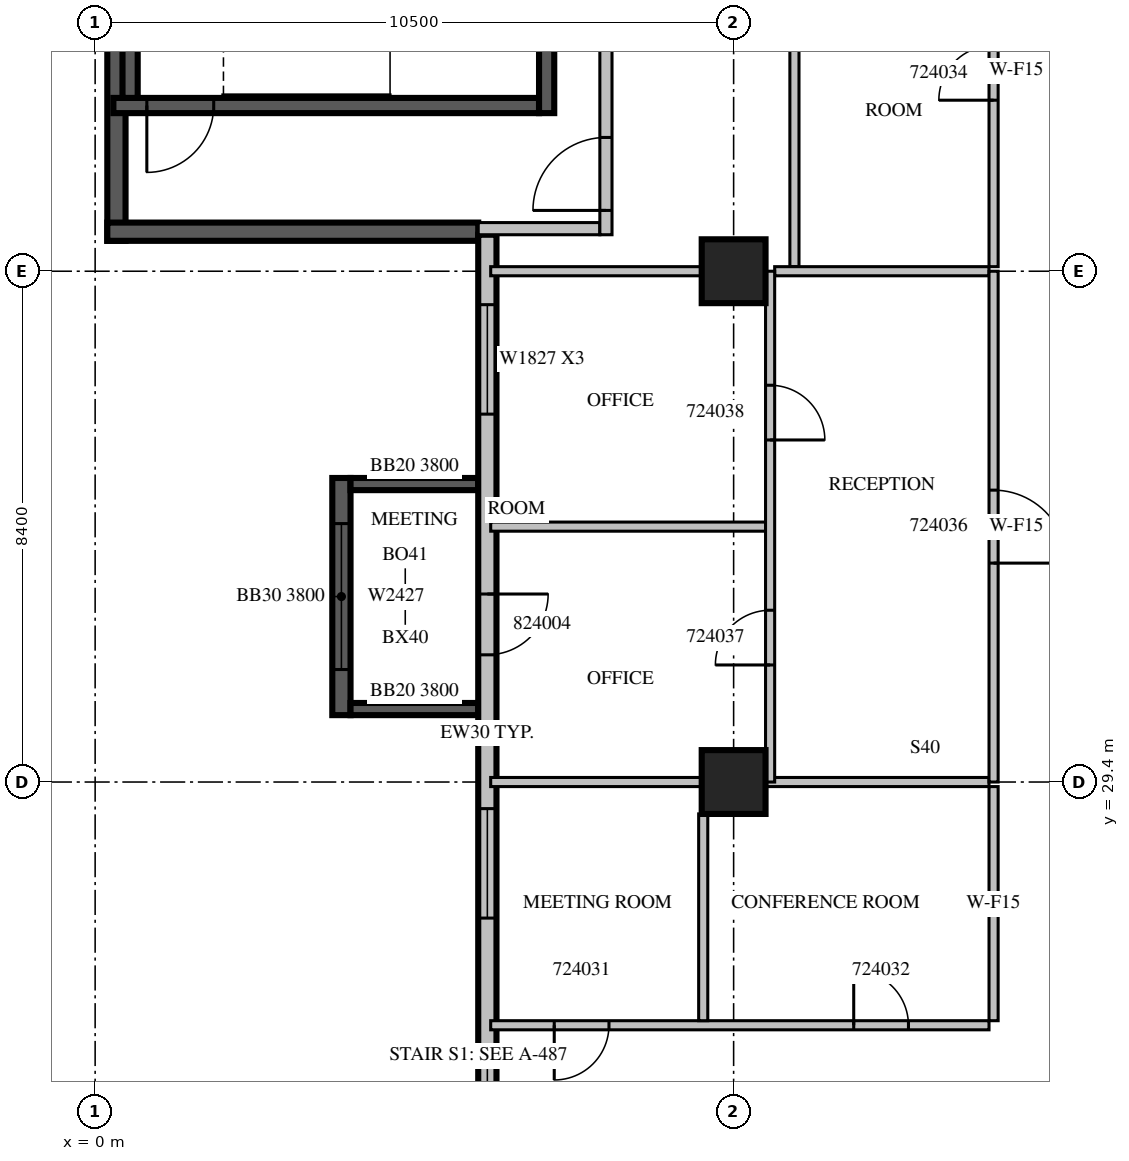
"""IFC4 building model, lengths in metres.
Left out: names, types, materials, properties, quantities, classifications, styles, units other than length and angle.
Written with IfcOpenShell. Run it as: python <this file> out.ifc"""

import sys

from ifc_helpers import new_model, si_unit, direction, frame, frame_2d, origin, origin_2d, place, context, subcontext, project, spatial, rectangle, extrude, source, transform, mapped, element, fill, save


model = new_model("IFC4")
c1 = context("Model", 3, precision=1e-05, world=origin(), true_north=direction((0.0, 1.0)))
c2 = subcontext(c1, "Body", "Model", "MODEL_VIEW")
j1 = project(units=[si_unit("LENGTHUNIT", "METRE"), si_unit("PLANEANGLEUNIT", "RADIAN")], contexts=[c1])
p1 = place(None, origin())
s1 = spatial("IfcSite", under=j1, at=p1, CompositionType="ELEMENT")
p2 = place(p1, origin())
s2 = spatial("IfcBuilding", under=s1, at=p2, CompositionType="ELEMENT")
p3 = place(p2, frame((0.0, 0.0, 111.9)))
s3 = spatial("IfcBuildingStorey", under=s2, at=p3, CompositionType="ELEMENT", Elevation=111.9)
m1 = source(origin(), c2, "Body", "SweptSolid", [
    extrude(rectangle(XDim=1.05, YDim=1.05, at=origin_2d()), origin(), (0.0, 0.0, 1.0), 4.2),
])
for number, where, z_axis, x_axis in (
    (1, (10.5, 29.4, 0.0), (0.0, 0.0, 1.0), (1.0, 0.0, 0.0)),
    (2, (10.5, 37.8, 0.0), (0.0, 0.0, 1.0), (1.0, 0.0, 0.0)),
):
    element("IfcColumn", number, at=place(p3, frame(where, z_axis=z_axis, x_axis=x_axis)), inside=s3, PredefinedType="COLUMN", context=c2, shape_type="MappedRepresentation", body=[
        mapped(m1, transform((0.0, 0.0, 0.0), scale=1.0)),
    ])
p4 = place(p3, frame((4.05, 34.4, 0.0), z_axis=(0.0, 0.0, 1.0), x_axis=(0.0, -1.0, 0.0)))
e3 = element("IfcWall", 3, at=p4, inside=s3, PredefinedType="SOLIDWALL", context=c2, shape_type="SweptSolid", body=[
    extrude(rectangle(XDim=3.9, YDim=0.3, at=frame_2d((1.95, 0.0))), origin(), (0.0, 0.0, 1.0), 3.8),
])
m2 = source(origin(), c2, "Body", "SweptSolid", [
    extrude(rectangle(XDim=2.4, YDim=2.7, at=frame_2d((1.2, 1.35))), frame((0.0, 0.16, 0.0), z_axis=(0.0, -1.0, 0.0), x_axis=(1.0, 0.0, 0.0)), (0.0, 0.0, 1.0), 0.32),
])
p5 = place(p4, frame((0.75, 0.0, 0.6)))
e4 = element("IfcOpeningElement", 4, at=p5, cuts=e3, PredefinedType="OPENING", context=c2, shape_type="MappedRepresentation", body=[
    mapped(m2, transform((0.0, 0.0, 0.0), scale=1.0)),
])
p6 = place(p3, frame((6.3, 34.3, 0.0), z_axis=(0.0, 0.0, 1.0), x_axis=(-1.0, 0.0, 0.0)))
e5 = element("IfcWall", 5, at=p6, inside=s3, PredefinedType="SOLIDWALL", context=c2, shape_type="SweptSolid", body=[
    extrude(rectangle(XDim=2.1, YDim=0.2, at=frame_2d((1.05, 0.0))), origin(), (0.0, 0.0, 1.0), 3.8),
])
m3 = source(origin(), c2, "Body", "SweptSolid", [
    extrude(rectangle(XDim=2.1, YDim=0.2, at=frame_2d((1.05, 0.0))), origin(), (0.0, 0.0, 1.0), 3.8),
])
p7 = place(p3, frame((6.3, 30.6, 0.0), z_axis=(0.0, 0.0, 1.0), x_axis=(-1.0, 0.0, 0.0)))
e6 = element("IfcWall", 6, at=p7, inside=s3, PredefinedType="SOLIDWALL", context=c2, shape_type="MappedRepresentation", body=[
    mapped(m3, transform((0.0, 0.0, 0.0), scale=1.0)),
])
m4 = source(origin(), c2, "Body", "SweptSolid", [
    extrude(rectangle(XDim=5.65, YDim=0.3, at=frame_2d((2.825, 0.0))), origin(), (0.0, 0.0, 1.0), 3.8),
])
p8 = place(p3, frame((0.35, 43.95, 0.0), z_axis=(0.0, 0.0, 1.0), x_axis=(0.0, -1.0, 0.0)))
e7 = element("IfcWall", 7, at=p8, inside=s3, PredefinedType="SOLIDWALL", context=c2, shape_type="MappedRepresentation", body=[
    mapped(m4, transform((0.0, 0.0, 0.0), scale=1.0)),
])
m5 = source(origin(), c2, "Body", "SweptSolid", [
    extrude(rectangle(XDim=6.1, YDim=0.3, at=frame_2d((3.05, 0.0))), origin(), (0.0, 0.0, 1.0), 3.8),
])
p9 = place(p3, frame((0.2, 38.45, 0.0), z_axis=(0.0, 0.0, 1.0), x_axis=(1.0, 0.0, 0.0)))
e8 = element("IfcWall", 8, at=p9, inside=s3, PredefinedType="SOLIDWALL", context=c2, shape_type="MappedRepresentation", body=[
    mapped(m5, transform((0.0, 0.0, 0.0), scale=1.0)),
])
m6 = source(origin(), c2, "Body", "SweptSolid", [
    extrude(rectangle(XDim=16.4, YDim=0.3, at=frame_2d((8.2, 0.0))), origin(), (0.0, 0.0, 1.0), 3.8),
])
p10 = place(p3, frame((6.45, 38.4, 0.0), z_axis=(0.0, 0.0, 1.0), x_axis=(0.0, -1.0, 0.0)))
e9 = element("IfcWall", 9, at=p10, inside=s3, PredefinedType="STANDARD", context=c2, shape_type="MappedRepresentation", body=[
    mapped(m6, transform((0.0, 0.0, 0.0), scale=1.0)),
])
m7 = source(origin(), c2, "Body", "SweptSolid", [
    extrude(rectangle(XDim=1.8, YDim=2.7, at=frame_2d((0.9, 1.35))), frame((0.0, 0.16, 0.0), z_axis=(0.0, -1.0, 0.0), x_axis=(1.0, 0.0, 0.0)), (0.0, 0.0, 1.0), 0.32),
])
p11 = place(p10, frame((1.15, 0.0, 0.6)))
e10 = element("IfcOpeningElement", 10, at=p11, cuts=e9, PredefinedType="OPENING", context=c2, shape_type="MappedRepresentation", body=[
    mapped(m7, transform((0.0, 0.0, 0.0), scale=1.0)),
])
p12 = place(p10, frame((9.438, 0.0, 0.6)))
e11 = element("IfcOpeningElement", 11, at=p12, cuts=e9, PredefinedType="OPENING", context=c2, shape_type="MappedRepresentation", body=[
    mapped(m7, transform((0.0, 0.0, 0.0), scale=1.0)),
])
p13 = place(p10, frame((13.537, 0.0, 0.6)))
e12 = element("IfcOpeningElement", 12, at=p13, cuts=e9, PredefinedType="OPENING", context=c2, shape_type="MappedRepresentation", body=[
    mapped(m7, transform((0.0, 0.0, 0.0), scale=1.0)),
])
m8 = source(origin(), c2, "Body", "SweptSolid", [
    extrude(rectangle(XDim=1.0, YDim=2.1, at=frame_2d((0.5, 1.05))), frame((0.0, 0.16, 0.0), z_axis=(0.0, -1.0, 0.0), x_axis=(1.0, 0.0, 0.0)), (0.0, 0.0, 1.0), 0.32),
])
p14 = place(p10, frame((5.908, 0.0, 0.0)))
e13 = element("IfcOpeningElement", 13, at=p14, cuts=e9, PredefinedType="OPENING", context=c2, shape_type="MappedRepresentation", body=[
    mapped(m8, transform((0.0, 0.0, 0.0), scale=1.0)),
])
m9 = source(origin(), c2, "Body", "SweptSolid", [
    extrude(rectangle(XDim=7.0, YDim=0.25, at=frame_2d((3.5, 0.0))), origin(), (0.0, 0.0, 1.0), 3.8),
])
p15 = place(p3, frame((0.3, 40.525, 0.0), z_axis=(0.0, 0.0, 1.0), x_axis=(1.0, 0.0, 0.0)))
e14 = element("IfcWall", 14, at=p15, inside=s3, PredefinedType="SOLIDWALL", context=c2, shape_type="MappedRepresentation", body=[
    mapped(m9, transform((0.0, 0.0, 0.0), scale=1.0)),
])
m10 = source(origin(), c2, "Body", "SweptSolid", [
    extrude(rectangle(XDim=1.1, YDim=2.1, at=frame_2d((0.55, 1.05))), frame((0.0, 0.135, 0.0), z_axis=(0.0, -1.0, 0.0), x_axis=(1.0, 0.0, 0.0)), (0.0, 0.0, 1.0), 0.27),
])
p16 = place(p15, frame((0.55, 0.0, 0.0)))
e15 = element("IfcOpeningElement", 15, at=p16, cuts=e14, PredefinedType="OPENING", context=c2, shape_type="MappedRepresentation", body=[
    mapped(m10, transform((0.0, 0.0, 0.0), scale=1.0)),
])
m11 = source(origin(), c2, "Body", "SweptSolid", [
    extrude(rectangle(XDim=3.45, YDim=0.25, at=frame_2d((1.725, 0.0))), origin(), (0.0, 0.0, 1.0), 3.8),
])
p17 = place(p3, frame((7.425, 40.4, 0.0), z_axis=(0.0, 0.0, 1.0), x_axis=(0.0, 1.0, 0.0)))
e16 = element("IfcWall", 16, at=p17, inside=s3, PredefinedType="SOLIDWALL", context=c2, shape_type="MappedRepresentation", body=[
    mapped(m11, transform((0.0, 0.0, 0.0), scale=1.0)),
])
m12 = source(origin(), c2, "Body", "SweptSolid", [
    extrude(rectangle(XDim=2.95, YDim=0.25, at=frame_2d((1.475, 0.0))), origin(), (0.0, 0.0, 1.0), 3.8),
])
p18 = place(p3, frame((0.575, 40.65, 0.0), z_axis=(0.0, 0.0, 1.0), x_axis=(0.0, 1.0, 0.0)))
e17 = element("IfcWall", 17, at=p18, inside=s3, PredefinedType="SOLIDWALL", context=c2, shape_type="MappedRepresentation", body=[
    mapped(m12, transform((0.0, 0.0, 0.0), scale=1.0)),
])
m13 = source(origin(), c2, "Body", "SweptSolid", [
    extrude(rectangle(XDim=2.0, YDim=0.2, at=frame_2d((1.0, 0.0))), origin(), (0.0, 0.0, 1.0), 3.8),
])
p19 = place(p3, frame((6.3, 38.5, 0.0), z_axis=(0.0, 0.0, 1.0), x_axis=(1.0, 0.0, 0.0)))
e18 = element("IfcWall", 18, at=p19, inside=s3, PredefinedType="PARTITIONING", context=c2, shape_type="MappedRepresentation", body=[
    mapped(m13, transform((0.0, 0.0, 0.0), scale=1.0)),
])
m14 = source(origin(), c2, "Body", "SweptSolid", [
    extrude(rectangle(XDim=5.45, YDim=0.2, at=frame_2d((2.725, 0.0))), origin(), (0.0, 0.0, 1.0), 3.8),
])
p20 = place(p3, frame((8.4, 38.4, 0.0), z_axis=(0.0, 0.0, 1.0), x_axis=(0.0, 1.0, 0.0)))
e19 = element("IfcWall", 19, at=p20, inside=s3, PredefinedType="PARTITIONING", context=c2, shape_type="MappedRepresentation", body=[
    mapped(m14, transform((0.0, 0.0, 0.0), scale=1.0)),
])
m15 = source(origin(), c2, "Body", "SweptSolid", [
    extrude(rectangle(XDim=1.2, YDim=2.1, at=frame_2d((0.6, 1.05))), frame((0.0, 0.11, 0.0), z_axis=(0.0, -1.0, 0.0), x_axis=(1.0, 0.0, 0.0)), (0.0, 0.0, 1.0), 0.22),
])
p21 = place(p20, frame((0.4, 0.0, 0.0)))
e20 = element("IfcOpeningElement", 20, at=p21, cuts=e19, PredefinedType="OPENING", context=c2, shape_type="MappedRepresentation", body=[
    mapped(m15, transform((0.0, 0.0, 0.0), scale=1.0)),
])
m16 = source(origin(), c2, "Body", "SweptSolid", [
    extrude(rectangle(XDim=0.9, YDim=2.1, at=frame_2d((0.45, 1.05))), frame((0.0, 0.11, 0.0), z_axis=(0.0, -1.0, 0.0), x_axis=(1.0, 0.0, 0.0)), (0.0, 0.0, 1.0), 0.22),
])
p22 = place(p20, frame((3.25, 0.0, 0.0)))
e21 = element("IfcOpeningElement", 21, at=p22, cuts=e19, PredefinedType="OPENING", context=c2, shape_type="MappedRepresentation", body=[
    mapped(m16, transform((0.0, 0.0, 0.0), scale=1.0)),
])
m17 = source(origin(), c2, "Body", "SweptSolid", [
    extrude(rectangle(XDim=8.195, YDim=0.15, at=frame_2d((4.098, 0.0))), origin(), (0.0, 0.0, 1.0), 3.8),
])
p23 = place(p3, frame((6.505, 25.4, 0.0), z_axis=(0.0, 0.0, 1.0), x_axis=(1.0, 0.0, 0.0)))
e22 = element("IfcWall", 22, at=p23, inside=s3, PredefinedType="PARTITIONING", context=c2, shape_type="MappedRepresentation", body=[
    mapped(m17, transform((0.0, 0.0, 0.0), scale=1.0)),
])
m18 = source(origin(), c2, "Body", "SweptSolid", [
    extrude(rectangle(XDim=0.9, YDim=2.1, at=frame_2d((0.45, 1.05))), frame((0.0, 0.085, 0.0), z_axis=(0.0, -1.0, 0.0), x_axis=(1.0, 0.0, 0.0)), (0.0, 0.0, 1.0), 0.17),
])
p24 = place(p23, frame((1.045, 0.0, 0.0)))
e23 = element("IfcOpeningElement", 23, at=p24, cuts=e22, PredefinedType="OPENING", context=c2, shape_type="MappedRepresentation", body=[
    mapped(m18, transform((0.0, 0.0, 0.0), scale=1.0)),
])
p25 = place(p23, frame((5.97, 0.0, 0.0)))
e24 = element("IfcOpeningElement", 24, at=p25, cuts=e22, PredefinedType="OPENING", context=c2, shape_type="MappedRepresentation", body=[
    mapped(m18, transform((0.0, 0.0, 0.0), scale=1.0)),
])
m19 = source(origin(), c2, "Body", "SweptSolid", [
    extrude(rectangle(XDim=3.401, YDim=0.15, at=frame_2d((1.7, 0.0))), origin(), (0.0, 0.0, 1.0), 3.8),
])
p26 = place(p3, frame((10.0, 25.475, 0.0), z_axis=(0.0, 0.0, 1.0), x_axis=(0.0, 1.0, 0.0)))
e25 = element("IfcWall", 25, at=p26, inside=s3, PredefinedType="PARTITIONING", context=c2, shape_type="MappedRepresentation", body=[
    mapped(m19, transform((0.0, 0.0, 0.0), scale=1.0)),
])
m20 = source(origin(), c2, "Body", "SweptSolid", [
    extrude(rectangle(XDim=3.85, YDim=0.15, at=frame_2d((1.925, 0.0))), origin(), (0.0, 0.0, 1.0), 3.8),
])
p27 = place(p3, frame((14.775, 25.475, 0.0), z_axis=(0.0, 0.0, 1.0), x_axis=(0.0, 1.0, 0.0)))
e26 = element("IfcWall", 26, at=p27, inside=s3, PredefinedType="PARTITIONING", context=c2, shape_type="MappedRepresentation", body=[
    mapped(m20, transform((0.0, 0.0, 0.0), scale=1.0)),
])
m21 = source(origin(), c2, "Body", "SweptSolid", [
    extrude(rectangle(XDim=3.471, YDim=0.15, at=frame_2d((1.736, 0.0))), origin(), (0.0, 0.0, 1.0), 3.8),
])
p28 = place(p3, frame((9.976, 29.4, 0.0), z_axis=(0.0, 0.0, 1.0), x_axis=(-1.0, 0.0, 0.0)))
e27 = element("IfcWall", 27, at=p28, inside=s3, PredefinedType="PARTITIONING", context=c2, shape_type="MappedRepresentation", body=[
    mapped(m21, transform((0.0, 0.0, 0.0), scale=1.0)),
])
m22 = source(origin(), c2, "Body", "SweptSolid", [
    extrude(rectangle(XDim=3.676, YDim=0.15, at=frame_2d((1.838, 0.0))), origin(), (0.0, 0.0, 1.0), 3.8),
])
p29 = place(p3, frame((14.7, 29.4, 0.0), z_axis=(0.0, 0.0, 1.0), x_axis=(-1.0, 0.0, 0.0)))
e28 = element("IfcWall", 28, at=p29, inside=s3, PredefinedType="PARTITIONING", context=c2, shape_type="MappedRepresentation", body=[
    mapped(m22, transform((0.0, 0.0, 0.0), scale=1.0)),
])
m23 = source(origin(), c2, "Body", "SweptSolid", [
    extrude(rectangle(XDim=6.45, YDim=0.15, at=frame_2d((3.225, 0.0))), origin(), (0.0, 0.0, 1.0), 3.8),
])
p30 = place(p3, frame((11.5, 44.325, 0.0), z_axis=(0.0, 0.0, 1.0), x_axis=(0.0, -1.0, 0.0)))
e29 = element("IfcWall", 29, at=p30, inside=s3, PredefinedType="PARTITIONING", context=c2, shape_type="MappedRepresentation", body=[
    mapped(m23, transform((0.0, 0.0, 0.0), scale=1.0)),
])
p31 = place(p3, frame((14.775, 37.875, 0.0), z_axis=(0.0, 0.0, 1.0), x_axis=(0.0, 1.0, 0.0)))
e30 = element("IfcWall", 30, at=p31, inside=s3, PredefinedType="PARTITIONING", context=c2, shape_type="MappedRepresentation", body=[
    mapped(m23, transform((0.0, 0.0, 0.0), scale=1.0)),
])
p32 = place(p31, frame((2.737, 0.0, 0.0)))
e31 = element("IfcOpeningElement", 31, at=p32, cuts=e30, PredefinedType="OPENING", context=c2, shape_type="MappedRepresentation", body=[
    mapped(m18, transform((0.0, 0.0, 0.0), scale=1.0)),
])
m24 = source(origin(), c2, "Body", "SweptSolid", [
    extrude(rectangle(XDim=4.52, YDim=0.15, at=frame_2d((2.26, 0.0))), origin(), (0.0, 0.0, 1.0), 3.8),
])
p33 = place(p3, frame((11.025, 33.6, 0.0), z_axis=(0.0, 0.0, 1.0), x_axis=(-1.0, 0.0, 0.0)))
e32 = element("IfcWall", 32, at=p33, inside=s3, PredefinedType="PARTITIONING", context=c2, shape_type="MappedRepresentation", body=[
    mapped(m24, transform((0.0, 0.0, 0.0), scale=1.0)),
])
p34 = place(p3, frame((9.976, 37.8, 0.0), z_axis=(0.0, 0.0, 1.0), x_axis=(-1.0, 0.0, 0.0)))
e33 = element("IfcWall", 33, at=p34, inside=s3, PredefinedType="PARTITIONING", context=c2, shape_type="MappedRepresentation", body=[
    mapped(m21, transform((0.0, 0.0, 0.0), scale=1.0)),
])
m25 = source(origin(), c2, "Body", "SweptSolid", [
    extrude(rectangle(XDim=3.525, YDim=0.15, at=frame_2d((1.762, 0.0))), origin(), (0.0, 0.0, 1.0), 3.8),
])
p35 = place(p3, frame((14.7, 37.8, 0.0), z_axis=(0.0, 0.0, 1.0), x_axis=(-1.0, 0.0, 0.0)))
e34 = element("IfcWall", 34, at=p35, inside=s3, PredefinedType="PARTITIONING", context=c2, shape_type="MappedRepresentation", body=[
    mapped(m25, transform((0.0, 0.0, 0.0), scale=1.0)),
])
m26 = source(origin(), c2, "Body", "SweptSolid", [
    extrude(rectangle(XDim=8.4, YDim=0.15, at=frame_2d((4.2, 0.0))), origin(), (0.0, 0.0, 1.0), 3.8),
])
p36 = place(p3, frame((11.1, 29.4, 0.0), z_axis=(0.0, 0.0, 1.0), x_axis=(0.0, 1.0, 0.0)))
e35 = element("IfcWall", 35, at=p36, inside=s3, PredefinedType="PARTITIONING", context=c2, shape_type="MappedRepresentation", body=[
    mapped(m26, transform((0.0, 0.0, 0.0), scale=1.0)),
])
p37 = place(p36, frame((1.925, 0.0, 0.0)))
e36 = element("IfcOpeningElement", 36, at=p37, cuts=e35, PredefinedType="OPENING", context=c2, shape_type="MappedRepresentation", body=[
    mapped(m18, transform((0.0, 0.0, 0.0), scale=1.0)),
])
p38 = place(p36, frame((5.625, 0.0, 0.0)))
e37 = element("IfcOpeningElement", 37, at=p38, cuts=e35, PredefinedType="OPENING", context=c2, shape_type="MappedRepresentation", body=[
    mapped(m18, transform((0.0, 0.0, 0.0), scale=1.0)),
])
p39 = place(p3, frame((14.775, 29.4, 0.0), z_axis=(0.0, 0.0, 1.0), x_axis=(0.0, 1.0, 0.0)))
e38 = element("IfcWall", 38, at=p39, inside=s3, PredefinedType="PARTITIONING", context=c2, shape_type="MappedRepresentation", body=[
    mapped(m26, transform((0.0, 0.0, 0.0), scale=1.0)),
])
m27 = source(origin(), c2, "Body", "SweptSolid", [
    extrude(rectangle(XDim=1.2, YDim=2.1, at=frame_2d((0.6, 1.05))), frame((0.0, 0.085, 0.0), z_axis=(0.0, -1.0, 0.0), x_axis=(1.0, 0.0, 0.0)), (0.0, 0.0, 1.0), 0.17),
])
p40 = place(p39, frame((3.6, 0.0, 0.0)))
e39 = element("IfcOpeningElement", 39, at=p40, cuts=e38, PredefinedType="OPENING", context=c2, shape_type="MappedRepresentation", body=[
    mapped(m27, transform((0.0, 0.0, 0.0), scale=1.0)),
])
m28 = source(origin(), c2, "Body", "SweptSolid", [
    extrude(rectangle(XDim=2.4, YDim=2.7, at=frame_2d((1.2, 1.35))), frame((0.0, 0.03, 0.0), z_axis=(0.0, -1.0, 0.0), x_axis=(1.0, 0.0, 0.0)), (0.0, 0.0, 1.0), 0.06),
])
p41 = place(p5, origin())
e40 = element("IfcWindow", 40, at=p41, inside=s3, PartitioningType="SINGLE_PANEL", PredefinedType="WINDOW", context=c2, shape_type="MappedRepresentation", body=[
    mapped(m28, transform((0.0, 0.0, 0.0), scale=1.0)),
])
fill(e4, e40)
m29 = source(origin(), c2, "Body", "SweptSolid", [
    extrude(rectangle(XDim=1.8, YDim=2.7, at=frame_2d((0.9, 1.35))), frame((0.0, 0.03, 0.0), z_axis=(0.0, -1.0, 0.0), x_axis=(1.0, 0.0, 0.0)), (0.0, 0.0, 1.0), 0.06),
])
p42 = place(p11, origin())
e41 = element("IfcWindow", 41, at=p42, inside=s3, PartitioningType="SINGLE_PANEL", PredefinedType="WINDOW", context=c2, shape_type="MappedRepresentation", body=[
    mapped(m29, transform((0.0, 0.0, 0.0), scale=1.0)),
])
fill(e10, e41)
p43 = place(p12, origin())
e42 = element("IfcWindow", 42, at=p43, inside=s3, PartitioningType="SINGLE_PANEL", PredefinedType="WINDOW", context=c2, shape_type="MappedRepresentation", body=[
    mapped(m29, transform((0.0, 0.0, 0.0), scale=1.0)),
])
fill(e11, e42)
p44 = place(p13, origin())
e43 = element("IfcWindow", 43, at=p44, inside=s3, PartitioningType="SINGLE_PANEL", PredefinedType="WINDOW", context=c2, shape_type="MappedRepresentation", body=[
    mapped(m29, transform((0.0, 0.0, 0.0), scale=1.0)),
])
fill(e12, e43)
m30 = source(origin(), c2, "Body", "SweptSolid", [
    extrude(rectangle(XDim=1.1, YDim=2.1, at=frame_2d((0.55, 1.05))), frame((0.0, 0.025, 0.0), z_axis=(0.0, -1.0, 0.0), x_axis=(1.0, 0.0, 0.0)), (0.0, 0.0, 1.0), 0.05),
])
p45 = place(p16, origin())
e44 = element("IfcDoor", 44, at=p45, inside=s3, OperationType="SINGLE_SWING_RIGHT", PredefinedType="DOOR", context=c2, shape_type="MappedRepresentation", body=[
    mapped(m30, transform((0.0, 0.0, 0.0), scale=1.0)),
])
fill(e15, e44)
m31 = source(origin(), c2, "Body", "SweptSolid", [
    extrude(rectangle(XDim=1.2, YDim=2.1, at=frame_2d((0.6, 1.05))), frame((0.0, 0.025, 0.0), z_axis=(0.0, -1.0, 0.0), x_axis=(1.0, 0.0, 0.0)), (0.0, 0.0, 1.0), 0.05),
])
p46 = place(p21, origin())
e45 = element("IfcDoor", 45, at=p46, inside=s3, OperationType="SINGLE_SWING_LEFT", PredefinedType="DOOR", context=c2, shape_type="MappedRepresentation", body=[
    mapped(m31, transform((0.0, 0.0, 0.0), scale=1.0)),
])
fill(e20, e45)
m32 = source(origin(), c2, "Body", "SweptSolid", [
    extrude(rectangle(XDim=0.9, YDim=2.1, at=frame_2d((0.45, 1.05))), frame((0.0, 0.025, 0.0), z_axis=(0.0, -1.0, 0.0), x_axis=(1.0, 0.0, 0.0)), (0.0, 0.0, 1.0), 0.05),
])
p47 = place(p24, origin())
e46 = element("IfcDoor", 46, at=p47, inside=s3, OperationType="SINGLE_SWING_RIGHT", PredefinedType="DOOR", context=c2, shape_type="MappedRepresentation", body=[
    mapped(m32, transform((0.0, 0.0, 0.0), scale=1.0)),
])
fill(e23, e46)
p48 = place(p25, origin())
e47 = element("IfcDoor", 47, at=p48, inside=s3, OperationType="SINGLE_SWING_LEFT", PredefinedType="DOOR", context=c2, shape_type="MappedRepresentation", body=[
    mapped(m32, transform((0.0, 0.0, 0.0), scale=1.0)),
])
fill(e24, e47)
p49 = place(p32, origin())
e48 = element("IfcDoor", 48, at=p49, inside=s3, OperationType="SINGLE_SWING_LEFT", PredefinedType="DOOR", context=c2, shape_type="MappedRepresentation", body=[
    mapped(m32, transform((0.0, 0.0, 0.0), scale=1.0)),
])
fill(e31, e48)
p50 = place(p40, origin())
e49 = element("IfcDoor", 49, at=p50, inside=s3, OperationType="SINGLE_SWING_RIGHT", PredefinedType="DOOR", context=c2, shape_type="MappedRepresentation", body=[
    mapped(m31, transform((0.0, 0.0, 0.0), scale=1.0)),
])
fill(e39, e49)
p51 = place(p37, origin())
e50 = element("IfcDoor", 50, at=p51, inside=s3, OperationType="SINGLE_SWING_LEFT", PredefinedType="DOOR", context=c2, shape_type="MappedRepresentation", body=[
    mapped(m32, transform((0.0, 0.0, 0.0), scale=1.0)),
])
fill(e36, e50)
p52 = place(p38, origin())
e51 = element("IfcDoor", 51, at=p52, inside=s3, OperationType="SINGLE_SWING_RIGHT", PredefinedType="DOOR", context=c2, shape_type="MappedRepresentation", body=[
    mapped(m32, transform((0.0, 0.0, 0.0), scale=1.0)),
])
fill(e37, e51)
m33 = source(origin(), c2, "Body", "SweptSolid", [
    extrude(rectangle(XDim=1.0, YDim=2.1, at=frame_2d((0.5, 1.05))), frame((0.0, 0.025, 0.0), z_axis=(0.0, -1.0, 0.0), x_axis=(1.0, 0.0, 0.0)), (0.0, 0.0, 1.0), 0.05),
])
p53 = place(p14, origin())
e52 = element("IfcDoor", 52, at=p53, inside=s3, OperationType="SINGLE_SWING_LEFT", PredefinedType="DOOR", context=c2, shape_type="MappedRepresentation", body=[
    mapped(m33, transform((0.0, 0.0, 0.0), scale=1.0)),
])
fill(e13, e52)
save(model, sys.argv[1])
